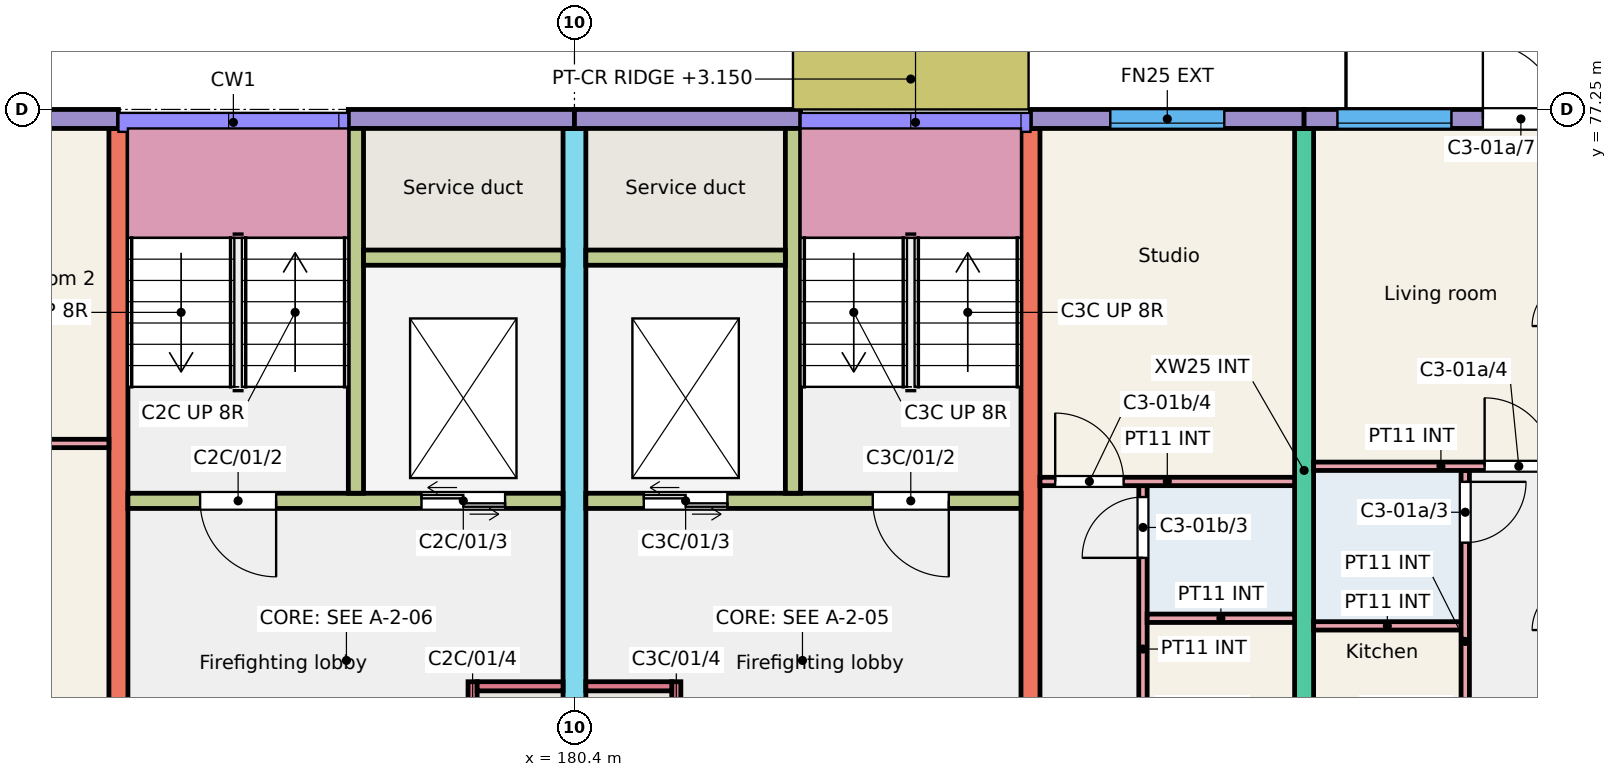
"""IFC4 building model, lengths in metres.
Left out: names, types, materials, properties, quantities, classifications, styles, units other than length and angle.
Written with IfcOpenShell. Run it as: python <this file> out.ifc"""

import sys

from ifc_helpers import new_model, si_unit, direction, frame, frame_2d, origin, place, context, subcontext, project, spatial, rectangle, extrude, element, fill, save


model = new_model("IFC4")
c1 = context("Model", 3, precision=1e-05, world=origin(), true_north=direction((0.0, 1.0)))
c2 = subcontext(c1, "Body", "Model", "MODEL_VIEW")
j1 = project(units=[si_unit("LENGTHUNIT", "METRE"), si_unit("PLANEANGLEUNIT", "RADIAN")], contexts=[c1])
p1 = place(None, origin())
s1 = spatial("IfcSite", under=j1, at=p1, CompositionType="ELEMENT")
p2 = place(p1, origin())
s2 = spatial("IfcBuilding", under=s1, at=p2, CompositionType="ELEMENT")
p3 = place(p2, frame((0.0, 0.0, 3.0)))
s3 = spatial("IfcBuildingStorey", under=s2, at=p3, CompositionType="ELEMENT", Elevation=3.0)
p4 = place(p3, frame((174.4, 68.0, 0.0), z_axis=(0.0, 0.0, 1.0), x_axis=(0.0, 1.0, 0.0)))
e1 = element("IfcWall", 1, at=p4, inside=s3, PredefinedType="SHEAR", context=c2, shape_type="SweptSolid", body=[
    extrude(rectangle(XDim=9.0, YDim=0.25, at=frame_2d((4.5, 0.0))), origin(), (0.0, 0.0, 1.0), 3.0),
])
p5 = place(p3, frame((180.4, 66.0, 0.0), z_axis=(0.0, 0.0, 1.0), x_axis=(0.0, 1.0, 0.0)))
e2 = element("IfcWall", 2, at=p5, inside=s3, PredefinedType="SHEAR", context=c2, shape_type="SweptSolid", body=[
    extrude(rectangle(XDim=11.0, YDim=0.3, at=frame_2d((5.5, 0.0))), origin(), (0.0, 0.0, 1.0), 3.0),
])
p6 = place(p5, frame((0.3, 0.0, 0.0)))
e3 = element("IfcOpeningElement", 3, at=p6, cuts=e2, PredefinedType="OPENING", context=c2, shape_type="SweptSolid", body=[
    extrude(rectangle(XDim=1.2, YDim=2.1, at=frame_2d((0.6, 1.05))), frame((0.0, 0.16, 0.0), z_axis=(0.0, -1.0, 0.0), x_axis=(1.0, 0.0, 0.0)), (0.0, 0.0, 1.0), 0.32),
])
for number, where, z_axis, x_axis in (
    (4, (186.4, 68.0, 0.0), (0.0, 0.0, 1.0), (0.0, 1.0, 0.0)),
    (5, (190.0, 68.0, 0.0), (0.0, 0.0, 1.0), (0.0, 1.0, 0.0)),
):
    element("IfcWall", number, at=place(p3, frame(where, z_axis=z_axis, x_axis=x_axis)), inside=s3, PredefinedType="SHEAR", context=c2, shape_type="SweptSolid", body=[
        extrude(rectangle(XDim=9.0, YDim=0.25, at=frame_2d((4.5, 0.0))), origin(), (0.0, 0.0, 1.0), 3.0),
    ])
p7 = place(p3, frame((170.8, 77.125, 0.0), z_axis=(0.0, 0.0, 1.0), x_axis=(1.0, 0.0, 0.0)))
e6 = element("IfcWall", 6, at=p7, inside=s3, PredefinedType="SOLIDWALL", context=c2, shape_type="SweptSolid", body=[
    extrude(rectangle(XDim=3.6, YDim=0.25, at=frame_2d((1.8, 0.0))), origin(), (0.0, 0.0, 1.0), 3.0),
])
p8 = place(p7, frame((1.038, 0.0, 0.9)))
e7 = element("IfcOpeningElement", 7, at=p8, cuts=e6, PredefinedType="OPENING", context=c2, shape_type="SweptSolid", body=[
    extrude(rectangle(XDim=1.5, YDim=1.5, at=frame_2d((0.75, 0.75))), frame((0.0, 0.135, 0.0), z_axis=(0.0, -1.0, 0.0), x_axis=(1.0, 0.0, 0.0)), (0.0, 0.0, 1.0), 0.27),
])
p9 = place(p3, frame((177.425, 77.125, 0.0), z_axis=(0.0, 0.0, 1.0), x_axis=(1.0, 0.0, 0.0)))
e8 = element("IfcWall", 8, at=p9, inside=s3, PredefinedType="SOLIDWALL", context=c2, shape_type="SweptSolid", body=[
    extrude(rectangle(XDim=2.975, YDim=0.25, at=frame_2d((1.487, 0.0))), origin(), (0.0, 0.0, 1.0), 3.0),
])
p10 = place(p3, frame((174.525, 72.1, 0.0), z_axis=(0.0, 0.0, 1.0), x_axis=(1.0, 0.0, 0.0)))
e9 = element("IfcWall", 9, at=p10, inside=s3, PredefinedType="SHEAR", context=c2, shape_type="SweptSolid", body=[
    extrude(rectangle(XDim=5.725, YDim=0.2, at=frame_2d((2.863, 0.0))), origin(), (0.0, 0.0, 1.0), 3.0),
])
p11 = place(p10, frame((0.95, 0.0, 0.0)))
e10 = element("IfcOpeningElement", 10, at=p11, cuts=e9, PredefinedType="OPENING", context=c2, shape_type="SweptSolid", body=[
    extrude(rectangle(XDim=1.0, YDim=2.1, at=frame_2d((0.5, 1.05))), frame((0.0, 0.11, 0.0), z_axis=(0.0, -1.0, 0.0), x_axis=(1.0, 0.0, 0.0)), (0.0, 0.0, 1.0), 0.22),
])
p12 = place(p10, frame((3.863, 0.0, 0.0)))
e11 = element("IfcOpeningElement", 11, at=p12, cuts=e9, PredefinedType="OPENING", context=c2, shape_type="SweptSolid", body=[
    extrude(rectangle(XDim=1.1, YDim=2.1, at=frame_2d((0.55, 1.05))), frame((0.0, 0.11, 0.0), z_axis=(0.0, -1.0, 0.0), x_axis=(1.0, 0.0, 0.0)), (0.0, 0.0, 1.0), 0.22),
])
p13 = place(p3, frame((177.525, 72.2, 0.0), z_axis=(0.0, 0.0, 1.0), x_axis=(0.0, 1.0, 0.0)))
e12 = element("IfcWall", 12, at=p13, inside=s3, PredefinedType="SHEAR", context=c2, shape_type="SweptSolid", body=[
    extrude(rectangle(XDim=4.8, YDim=0.2, at=frame_2d((2.4, 0.0))), origin(), (0.0, 0.0, 1.0), 3.0),
])
p14 = place(p3, frame((177.625, 75.3, 0.0), z_axis=(0.0, 0.0, 1.0), x_axis=(1.0, 0.0, 0.0)))
e13 = element("IfcWall", 13, at=p14, inside=s3, PredefinedType="SHEAR", context=c2, shape_type="SweptSolid", body=[
    extrude(rectangle(XDim=2.625, YDim=0.2, at=frame_2d((1.312, 0.0))), origin(), (0.0, 0.0, 1.0), 3.0),
])
p15 = place(p3, frame((179.06, 68.0, 0.0), z_axis=(0.0, 0.0, 1.0), x_axis=(0.0, 1.0, 0.0)))
e14 = element("IfcWall", 14, at=p15, inside=s3, PredefinedType="SHEAR", context=c2, shape_type="SweptSolid", body=[
    extrude(rectangle(XDim=1.72, YDim=0.12, at=frame_2d((0.86, 0.0))), origin(), (0.0, 0.0, 1.0), 3.0),
])
p16 = place(p15, frame((0.45, 0.0, 0.0)))
e15 = element("IfcOpeningElement", 15, at=p16, cuts=e14, PredefinedType="OPENING", context=c2, shape_type="SweptSolid", body=[
    extrude(rectangle(XDim=0.9, YDim=2.1, at=frame_2d((0.45, 1.05))), frame((0.0, 0.07, 0.0), z_axis=(0.0, -1.0, 0.0), x_axis=(1.0, 0.0, 0.0)), (0.0, 0.0, 1.0), 0.14),
])
p17 = place(p3, frame((179.12, 69.66, 0.0), z_axis=(0.0, 0.0, 1.0), x_axis=(1.0, 0.0, 0.0)))
e16 = element("IfcWall", 16, at=p17, inside=s3, PredefinedType="SHEAR", context=c2, shape_type="SweptSolid", body=[
    extrude(rectangle(XDim=1.13, YDim=0.12, at=frame_2d((0.565, 0.0))), origin(), (0.0, 0.0, 1.0), 3.0),
])
p18 = place(p3, frame((180.4, 77.125, 0.0), z_axis=(0.0, 0.0, 1.0), x_axis=(1.0, 0.0, 0.0)))
e17 = element("IfcWall", 17, at=p18, inside=s3, PredefinedType="SOLIDWALL", context=c2, shape_type="SweptSolid", body=[
    extrude(rectangle(XDim=2.975, YDim=0.25, at=frame_2d((1.488, 0.0))), origin(), (0.0, 0.0, 1.0), 3.0),
])
p19 = place(p3, frame((180.55, 72.1, 0.0), z_axis=(0.0, 0.0, 1.0), x_axis=(1.0, 0.0, 0.0)))
e18 = element("IfcWall", 18, at=p19, inside=s3, PredefinedType="SHEAR", context=c2, shape_type="SweptSolid", body=[
    extrude(rectangle(XDim=5.725, YDim=0.2, at=frame_2d((2.862, 0.0))), origin(), (0.0, 0.0, 1.0), 3.0),
])
p20 = place(p19, frame((3.775, 0.0, 0.0)))
e19 = element("IfcOpeningElement", 19, at=p20, cuts=e18, PredefinedType="OPENING", context=c2, shape_type="SweptSolid", body=[
    extrude(rectangle(XDim=1.0, YDim=2.1, at=frame_2d((0.5, 1.05))), frame((0.0, 0.11, 0.0), z_axis=(0.0, -1.0, 0.0), x_axis=(1.0, 0.0, 0.0)), (0.0, 0.0, 1.0), 0.22),
])
p21 = place(p19, frame((0.762, 0.0, 0.0)))
e20 = element("IfcOpeningElement", 20, at=p21, cuts=e18, PredefinedType="OPENING", context=c2, shape_type="SweptSolid", body=[
    extrude(rectangle(XDim=1.1, YDim=2.1, at=frame_2d((0.55, 1.05))), frame((0.0, 0.11, 0.0), z_axis=(0.0, -1.0, 0.0), x_axis=(1.0, 0.0, 0.0)), (0.0, 0.0, 1.0), 0.22),
])
p22 = place(p3, frame((183.275, 72.2, 0.0), z_axis=(0.0, 0.0, 1.0), x_axis=(0.0, 1.0, 0.0)))
e21 = element("IfcWall", 21, at=p22, inside=s3, PredefinedType="SHEAR", context=c2, shape_type="SweptSolid", body=[
    extrude(rectangle(XDim=4.8, YDim=0.2, at=frame_2d((2.4, 0.0))), origin(), (0.0, 0.0, 1.0), 3.0),
])
p23 = place(p3, frame((180.55, 75.3, 0.0), z_axis=(0.0, 0.0, 1.0), x_axis=(1.0, 0.0, 0.0)))
e22 = element("IfcWall", 22, at=p23, inside=s3, PredefinedType="SHEAR", context=c2, shape_type="SweptSolid", body=[
    extrude(rectangle(XDim=2.625, YDim=0.2, at=frame_2d((1.312, 0.0))), origin(), (0.0, 0.0, 1.0), 3.0),
])
p24 = place(p3, frame((181.74, 68.0, 0.0), z_axis=(0.0, 0.0, 1.0), x_axis=(0.0, 1.0, 0.0)))
e23 = element("IfcWall", 23, at=p24, inside=s3, PredefinedType="SHEAR", context=c2, shape_type="SweptSolid", body=[
    extrude(rectangle(XDim=1.72, YDim=0.12, at=frame_2d((0.86, 0.0))), origin(), (0.0, 0.0, 1.0), 3.0),
])
p25 = place(p24, frame((0.45, 0.0, 0.0)))
e24 = element("IfcOpeningElement", 24, at=p25, cuts=e23, PredefinedType="OPENING", context=c2, shape_type="SweptSolid", body=[
    extrude(rectangle(XDim=0.9, YDim=2.1, at=frame_2d((0.45, 1.05))), frame((0.0, 0.07, 0.0), z_axis=(0.0, -1.0, 0.0), x_axis=(1.0, 0.0, 0.0)), (0.0, 0.0, 1.0), 0.14),
])
p26 = place(p3, frame((180.55, 69.66, 0.0), z_axis=(0.0, 0.0, 1.0), x_axis=(1.0, 0.0, 0.0)))
e25 = element("IfcWall", 25, at=p26, inside=s3, PredefinedType="SHEAR", context=c2, shape_type="SweptSolid", body=[
    extrude(rectangle(XDim=1.13, YDim=0.12, at=frame_2d((0.565, 0.0))), origin(), (0.0, 0.0, 1.0), 3.0),
])
p27 = place(p3, frame((186.4, 77.125, 0.0), z_axis=(0.0, 0.0, 1.0), x_axis=(1.0, 0.0, 0.0)))
e26 = element("IfcWall", 26, at=p27, inside=s3, PredefinedType="SOLIDWALL", context=c2, shape_type="SweptSolid", body=[
    extrude(rectangle(XDim=3.6, YDim=0.25, at=frame_2d((1.8, 0.0))), origin(), (0.0, 0.0, 1.0), 3.0),
])
p28 = place(p27, frame((1.05, 0.0, 0.9)))
e27 = element("IfcOpeningElement", 27, at=p28, cuts=e26, PredefinedType="OPENING", context=c2, shape_type="SweptSolid", body=[
    extrude(rectangle(XDim=1.5, YDim=1.5, at=frame_2d((0.75, 0.75))), frame((0.0, 0.135, 0.0), z_axis=(0.0, -1.0, 0.0), x_axis=(1.0, 0.0, 0.0)), (0.0, 0.0, 1.0), 0.27),
])
p29 = place(p3, frame((190.0, 77.125, 0.0), z_axis=(0.0, 0.0, 1.0), x_axis=(1.0, 0.0, 0.0)))
e28 = element("IfcWall", 28, at=p29, inside=s3, PredefinedType="SOLIDWALL", context=c2, shape_type="SweptSolid", body=[
    extrude(rectangle(XDim=3.6, YDim=0.25, at=frame_2d((1.8, 0.0))), origin(), (0.0, 0.0, 1.0), 3.0),
])
p30 = place(p29, frame((0.438, 0.0, 0.9)))
e29 = element("IfcOpeningElement", 29, at=p30, cuts=e28, PredefinedType="OPENING", context=c2, shape_type="SweptSolid", body=[
    extrude(rectangle(XDim=1.5, YDim=1.5, at=frame_2d((0.75, 0.75))), frame((0.0, 0.135, 0.0), z_axis=(0.0, -1.0, 0.0), x_axis=(1.0, 0.0, 0.0)), (0.0, 0.0, 1.0), 0.27),
])
p31 = place(p29, frame((2.352, 0.0, 0.0)))
e30 = element("IfcOpeningElement", 30, at=p31, cuts=e28, PredefinedType="OPENING", context=c2, shape_type="SweptSolid", body=[
    extrude(rectangle(XDim=1.0, YDim=2.1, at=frame_2d((0.5, 1.05))), frame((0.0, 0.135, 0.0), z_axis=(0.0, -1.0, 0.0), x_axis=(1.0, 0.0, 0.0)), (0.0, 0.0, 1.0), 0.27),
])
p32 = place(p3, frame((170.9, 72.855, 0.0), z_axis=(0.0, 0.0, 1.0), x_axis=(1.0, 0.0, 0.0)))
e31 = element("IfcWall", 31, at=p32, inside=s3, PredefinedType="PARTITIONING", context=c2, shape_type="SweptSolid", body=[
    extrude(rectangle(XDim=3.375, YDim=0.11, at=frame_2d((1.688, 0.0))), origin(), (0.0, 0.0, 1.0), 2.8),
])
p33 = place(p3, frame((190.125, 70.455, 0.0), z_axis=(0.0, 0.0, 1.0), x_axis=(1.0, 0.0, 0.0)))
e32 = element("IfcWall", 32, at=p33, inside=s3, PredefinedType="PARTITIONING", context=c2, shape_type="SweptSolid", body=[
    extrude(rectangle(XDim=1.94, YDim=0.11, at=frame_2d((0.97, 0.0))), origin(), (0.0, 0.0, 1.0), 2.8),
])
p34 = place(p3, frame((192.12, 68.0, 0.0), z_axis=(0.0, 0.0, 1.0), x_axis=(0.0, 1.0, 0.0)))
e33 = element("IfcWall", 33, at=p34, inside=s3, PredefinedType="PARTITIONING", context=c2, shape_type="SweptSolid", body=[
    extrude(rectangle(XDim=4.5, YDim=0.11, at=frame_2d((2.25, 0.0))), origin(), (0.0, 0.0, 1.0), 2.8),
])
p35 = place(p34, frame((0.2, 0.0, 0.0)))
e34 = element("IfcOpeningElement", 34, at=p35, cuts=e33, PredefinedType="OPENING", context=c2, shape_type="SweptSolid", body=[
    extrude(rectangle(XDim=0.8, YDim=2.1, at=frame_2d((0.4, 1.05))), frame((0.0, 0.065, 0.0), z_axis=(0.0, -1.0, 0.0), x_axis=(1.0, 0.0, 0.0)), (0.0, 0.0, 1.0), 0.13),
])
p36 = place(p34, frame((3.55, 0.0, 0.0)))
e35 = element("IfcOpeningElement", 35, at=p36, cuts=e33, PredefinedType="OPENING", context=c2, shape_type="SweptSolid", body=[
    extrude(rectangle(XDim=0.8, YDim=2.1, at=frame_2d((0.4, 1.05))), frame((0.0, 0.065, 0.0), z_axis=(0.0, -1.0, 0.0), x_axis=(1.0, 0.0, 0.0)), (0.0, 0.0, 1.0), 0.13),
])
p37 = place(p3, frame((190.125, 72.555, 0.0), z_axis=(0.0, 0.0, 1.0), x_axis=(1.0, 0.0, 0.0)))
e36 = element("IfcWall", 36, at=p37, inside=s3, PredefinedType="PARTITIONING", context=c2, shape_type="SweptSolid", body=[
    extrude(rectangle(XDim=3.35, YDim=0.11, at=frame_2d((1.675, 0.0))), origin(), (0.0, 0.0, 1.0), 2.8),
])
p38 = place(p37, frame((2.25, 0.0, 0.0)))
e37 = element("IfcOpeningElement", 37, at=p38, cuts=e36, PredefinedType="OPENING", context=c2, shape_type="SweptSolid", body=[
    extrude(rectangle(XDim=0.9, YDim=2.1, at=frame_2d((0.45, 1.05))), frame((0.0, 0.065, 0.0), z_axis=(0.0, -1.0, 0.0), x_axis=(1.0, 0.0, 0.0)), (0.0, 0.0, 1.0), 0.13),
])
p39 = place(p3, frame((187.88, 68.0, 0.0), z_axis=(0.0, 0.0, 1.0), x_axis=(0.0, 1.0, 0.0)))
e38 = element("IfcWall", 38, at=p39, inside=s3, PredefinedType="PARTITIONING", context=c2, shape_type="SweptSolid", body=[
    extrude(rectangle(XDim=4.3, YDim=0.11, at=frame_2d((2.15, 0.0))), origin(), (0.0, 0.0, 1.0), 2.8),
])
p40 = place(p39, frame((0.2, 0.0, 0.0)))
e39 = element("IfcOpeningElement", 39, at=p40, cuts=e38, PredefinedType="OPENING", context=c2, shape_type="SweptSolid", body=[
    extrude(rectangle(XDim=0.8, YDim=2.1, at=frame_2d((0.4, 1.05))), frame((0.0, 0.065, 0.0), z_axis=(0.0, -1.0, 0.0), x_axis=(1.0, 0.0, 0.0)), (0.0, 0.0, 1.0), 0.13),
])
p41 = place(p39, frame((3.35, 0.0, 0.0)))
e40 = element("IfcOpeningElement", 40, at=p41, cuts=e38, PredefinedType="OPENING", context=c2, shape_type="SweptSolid", body=[
    extrude(rectangle(XDim=0.8, YDim=2.1, at=frame_2d((0.4, 1.05))), frame((0.0, 0.065, 0.0), z_axis=(0.0, -1.0, 0.0), x_axis=(1.0, 0.0, 0.0)), (0.0, 0.0, 1.0), 0.13),
])
p42 = place(p3, frame((187.935, 70.555, 0.0), z_axis=(0.0, 0.0, 1.0), x_axis=(1.0, 0.0, 0.0)))
e41 = element("IfcWall", 41, at=p42, inside=s3, PredefinedType="PARTITIONING", context=c2, shape_type="SweptSolid", body=[
    extrude(rectangle(XDim=1.94, YDim=0.11, at=frame_2d((0.97, 0.0))), origin(), (0.0, 0.0, 1.0), 2.8),
])
p43 = place(p3, frame((186.525, 72.355, 0.0), z_axis=(0.0, 0.0, 1.0), x_axis=(1.0, 0.0, 0.0)))
e42 = element("IfcWall", 42, at=p43, inside=s3, PredefinedType="PARTITIONING", context=c2, shape_type="SweptSolid", body=[
    extrude(rectangle(XDim=3.35, YDim=0.11, at=frame_2d((1.675, 0.0))), origin(), (0.0, 0.0, 1.0), 2.8),
])
p44 = place(p43, frame((0.2, 0.0, 0.0)))
e43 = element("IfcOpeningElement", 43, at=p44, cuts=e42, PredefinedType="OPENING", context=c2, shape_type="SweptSolid", body=[
    extrude(rectangle(XDim=0.9, YDim=2.1, at=frame_2d((0.45, 1.05))), frame((0.0, 0.065, 0.0), z_axis=(0.0, -1.0, 0.0), x_axis=(1.0, 0.0, 0.0)), (0.0, 0.0, 1.0), 0.13),
])
p45 = place(p30, origin())
e44 = element("IfcWindow", 44, at=p45, inside=s3, PartitioningType="SINGLE_PANEL", PredefinedType="WINDOW", context=c2, shape_type="SweptSolid", body=[
    extrude(rectangle(XDim=1.5, YDim=1.5, at=frame_2d((0.75, 0.75))), frame((0.0, -0.025, 0.0), z_axis=(0.0, -1.0, 0.0), x_axis=(1.0, 0.0, 0.0)), (0.0, 0.0, 1.0), 0.06),
])
fill(e29, e44)
p46 = place(p28, origin())
e45 = element("IfcWindow", 45, at=p46, inside=s3, PartitioningType="SINGLE_PANEL", PredefinedType="WINDOW", context=c2, shape_type="SweptSolid", body=[
    extrude(rectangle(XDim=1.5, YDim=1.5, at=frame_2d((0.75, 0.75))), frame((0.0, -0.025, 0.0), z_axis=(0.0, -1.0, 0.0), x_axis=(1.0, 0.0, 0.0)), (0.0, 0.0, 1.0), 0.06),
])
fill(e27, e45)
p47 = place(p36, origin())
e46 = element("IfcDoor", 46, at=p47, inside=s3, OperationType="SINGLE_SWING_RIGHT", PredefinedType="DOOR", context=c2, shape_type="SweptSolid", body=[
    extrude(rectangle(XDim=0.8, YDim=2.1, at=frame_2d((0.4, 1.05))), frame((0.0, 0.025, 0.0), z_axis=(0.0, -1.0, 0.0), x_axis=(1.0, 0.0, 0.0)), (0.0, 0.0, 1.0), 0.05),
])
fill(e35, e46)
p48 = place(p38, origin())
e47 = element("IfcDoor", 47, at=p48, inside=s3, OperationType="SINGLE_SWING_LEFT", PredefinedType="DOOR", context=c2, shape_type="SweptSolid", body=[
    extrude(rectangle(XDim=0.9, YDim=2.1, at=frame_2d((0.45, 1.05))), frame((0.0, 0.025, 0.0), z_axis=(0.0, -1.0, 0.0), x_axis=(1.0, 0.0, 0.0)), (0.0, 0.0, 1.0), 0.05),
])
fill(e37, e47)
p49 = place(p31, origin())
e48 = element("IfcDoor", 48, at=p49, inside=s3, OperationType="SINGLE_SWING_LEFT", PredefinedType="DOOR", context=c2, shape_type="SweptSolid", body=[
    extrude(rectangle(XDim=1.0, YDim=2.1, at=frame_2d((0.5, 1.05))), frame((0.0, 0.025, 0.0), z_axis=(0.0, -1.0, 0.0), x_axis=(1.0, 0.0, 0.0)), (0.0, 0.0, 1.0), 0.05),
])
fill(e30, e48)
p50 = place(p41, origin())
e49 = element("IfcDoor", 49, at=p50, inside=s3, OperationType="SINGLE_SWING_LEFT", PredefinedType="DOOR", context=c2, shape_type="SweptSolid", body=[
    extrude(rectangle(XDim=0.8, YDim=2.1, at=frame_2d((0.4, 1.05))), frame((0.0, 0.025, 0.0), z_axis=(0.0, -1.0, 0.0), x_axis=(1.0, 0.0, 0.0)), (0.0, 0.0, 1.0), 0.05),
])
fill(e40, e49)
p51 = place(p44, origin())
e50 = element("IfcDoor", 50, at=p51, inside=s3, OperationType="SINGLE_SWING_LEFT", PredefinedType="DOOR", context=c2, shape_type="SweptSolid", body=[
    extrude(rectangle(XDim=0.9, YDim=2.1, at=frame_2d((0.45, 1.05))), frame((0.0, 0.025, 0.0), z_axis=(0.0, -1.0, 0.0), x_axis=(1.0, 0.0, 0.0)), (0.0, 0.0, 1.0), 0.05),
])
fill(e43, e50)
p52 = place(p11, origin())
e51 = element("IfcDoor", 51, at=p52, inside=s3, OperationType="SINGLE_SWING_RIGHT", PredefinedType="DOOR", context=c2, shape_type="SweptSolid", body=[
    extrude(rectangle(XDim=1.0, YDim=2.1, at=frame_2d((0.5, 1.05))), frame((0.0, 0.025, 0.0), z_axis=(0.0, -1.0, 0.0), x_axis=(1.0, 0.0, 0.0)), (0.0, 0.0, 1.0), 0.05),
])
fill(e10, e51)
p53 = place(p12, origin())
e52 = element("IfcDoor", 52, at=p53, inside=s3, OperationType="DOUBLE_DOOR_SLIDING", PredefinedType="DOOR", context=c2, shape_type="SweptSolid", body=[
    extrude(rectangle(XDim=1.1, YDim=2.1, at=frame_2d((0.55, 1.05))), frame((0.0, 0.025, 0.0), z_axis=(0.0, -1.0, 0.0), x_axis=(1.0, 0.0, 0.0)), (0.0, 0.0, 1.0), 0.05),
])
fill(e11, e52)
p54 = place(p20, origin())
e53 = element("IfcDoor", 53, at=p54, inside=s3, OperationType="SINGLE_SWING_RIGHT", PredefinedType="DOOR", context=c2, shape_type="SweptSolid", body=[
    extrude(rectangle(XDim=1.0, YDim=2.1, at=frame_2d((0.5, 1.05))), frame((0.0, 0.025, 0.0), z_axis=(0.0, -1.0, 0.0), x_axis=(1.0, 0.0, 0.0)), (0.0, 0.0, 1.0), 0.05),
])
fill(e19, e53)
p55 = place(p21, origin())
e54 = element("IfcDoor", 54, at=p55, inside=s3, OperationType="DOUBLE_DOOR_SLIDING", PredefinedType="DOOR", context=c2, shape_type="SweptSolid", body=[
    extrude(rectangle(XDim=1.1, YDim=2.1, at=frame_2d((0.55, 1.05))), frame((0.0, 0.025, 0.0), z_axis=(0.0, -1.0, 0.0), x_axis=(1.0, 0.0, 0.0)), (0.0, 0.0, 1.0), 0.05),
])
fill(e20, e54)
save(model, sys.argv[1])
